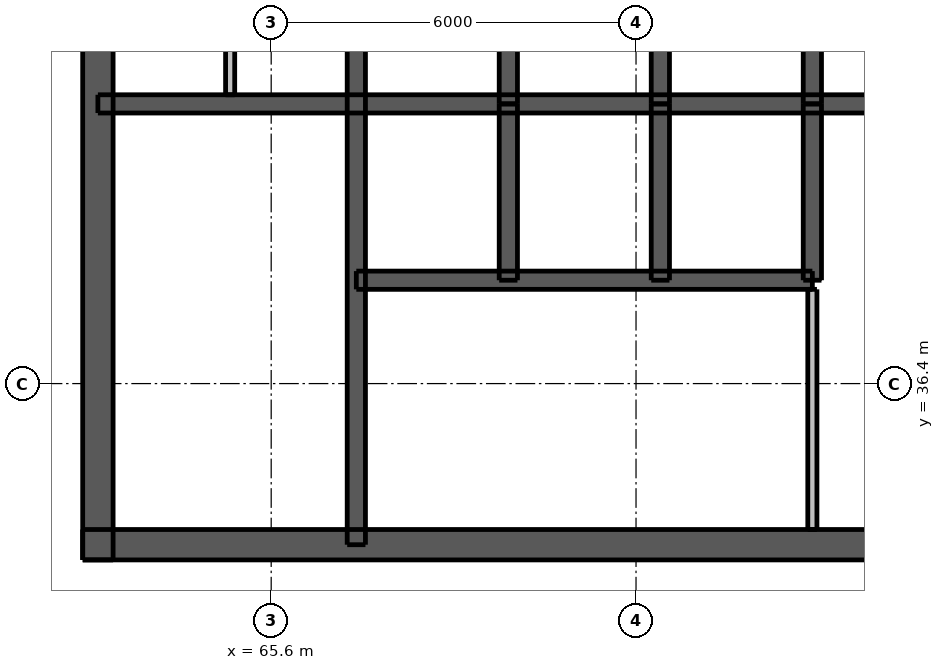
"""IFC4 building model, lengths in metres.
Left out: names, types, materials, properties, quantities, classifications, styles, units other than length and angle.
Written with IfcOpenShell. Run it as: python <this file> out.ifc"""

import sys

from ifc_helpers import new_model, si_unit, direction, frame, frame_2d, origin, place, context, subcontext, project, spatial, rectangle, extrude, element, fill, save


model = new_model("IFC4")
c1 = context("Model", 3, precision=1e-05, world=origin(), true_north=direction((0.0, 1.0)))
c2 = subcontext(c1, "Body", "Model", "MODEL_VIEW")
j1 = project(units=[si_unit("LENGTHUNIT", "METRE"), si_unit("PLANEANGLEUNIT", "RADIAN")], contexts=[c1])
p1 = place(None, origin())
s1 = spatial("IfcSite", under=j1, at=p1, CompositionType="ELEMENT")
p2 = place(p1, origin())
s2 = spatial("IfcBuilding", under=s1, at=p2, CompositionType="ELEMENT")
p3 = place(p2, frame((0.0, 0.0, 281.8)))
s3 = spatial("IfcBuildingStorey", under=s2, at=p3, CompositionType="ELEMENT", Elevation=281.8)
p4 = place(p3, frame((62.5, 33.75, 0.0), z_axis=(0.0, 0.0, 1.0), x_axis=(1.0, 0.0, 0.0)))
e1 = element("IfcWall", 1, at=p4, inside=s3, PredefinedType="SHEAR", context=c2, shape_type="SweptSolid", body=[
    extrude(rectangle(XDim=24.0, YDim=0.5, at=frame_2d((12.0, 0.0))), origin(), (0.0, 0.0, 1.0), 4.2),
])
p5 = place(p4, frame((1.875, 0.0, 0.0)))
e2 = element("IfcOpeningElement", 2, at=p5, cuts=e1, PredefinedType="OPENING", context=c2, shape_type="SweptSolid", body=[
    extrude(rectangle(XDim=1.1, YDim=2.1, at=frame_2d((0.55, 1.05))), frame((0.0, 0.26, 0.0), z_axis=(0.0, -1.0, 0.0), x_axis=(1.0, 0.0, 0.0)), (0.0, 0.0, 1.0), 0.52),
])
p6 = place(p4, frame((21.025, 0.0, 0.0)))
e3 = element("IfcOpeningElement", 3, at=p6, cuts=e1, PredefinedType="OPENING", context=c2, shape_type="SweptSolid", body=[
    extrude(rectangle(XDim=1.1, YDim=2.1, at=frame_2d((0.55, 1.05))), frame((0.0, 0.26, 0.0), z_axis=(0.0, -1.0, 0.0), x_axis=(1.0, 0.0, 0.0)), (0.0, 0.0, 1.0), 0.52),
])
p7 = place(p4, frame((8.0, 0.0, 0.0)))
e4 = element("IfcOpeningElement", 4, at=p7, cuts=e1, PredefinedType="OPENING", context=c2, shape_type="SweptSolid", body=[
    extrude(rectangle(XDim=1.1, YDim=2.1, at=frame_2d((0.55, 1.05))), frame((0.0, 0.26, 0.0), z_axis=(0.0, -1.0, 0.0), x_axis=(1.0, 0.0, 0.0)), (0.0, 0.0, 1.0), 0.52),
])
p8 = place(p4, frame((13.5, 0.0, 0.0)))
e5 = element("IfcOpeningElement", 5, at=p8, cuts=e1, PredefinedType="OPENING", context=c2, shape_type="SweptSolid", body=[
    extrude(rectangle(XDim=0.9, YDim=2.1, at=frame_2d((0.45, 1.05))), frame((0.0, 0.26, 0.0), z_axis=(0.0, -1.0, 0.0), x_axis=(1.0, 0.0, 0.0)), (0.0, 0.0, 1.0), 0.52),
])
p9 = place(p4, frame((17.1, 0.0, 0.0)))
e6 = element("IfcOpeningElement", 6, at=p9, cuts=e1, PredefinedType="OPENING", context=c2, shape_type="SweptSolid", body=[
    extrude(rectangle(XDim=0.9, YDim=2.1, at=frame_2d((0.45, 1.05))), frame((0.0, 0.26, 0.0), z_axis=(0.0, -1.0, 0.0), x_axis=(1.0, 0.0, 0.0)), (0.0, 0.0, 1.0), 0.52),
])
p10 = place(p3, frame((62.75, 33.5, 0.0), z_axis=(0.0, 0.0, 1.0), x_axis=(0.0, 1.0, 0.0)))
e7 = element("IfcWall", 7, at=p10, inside=s3, PredefinedType="SHEAR", context=c2, shape_type="SweptSolid", body=[
    extrude(rectangle(XDim=24.0, YDim=0.5, at=frame_2d((12.0, 0.0))), origin(), (0.0, 0.0, 1.0), 4.2),
])
p11 = place(p10, frame((11.2, 0.0, 0.0)))
e8 = element("IfcOpeningElement", 8, at=p11, cuts=e7, PredefinedType="OPENING", context=c2, shape_type="SweptSolid", body=[
    extrude(rectangle(XDim=1.6, YDim=2.1, at=frame_2d((0.8, 1.05))), frame((0.0, 0.26, 0.0), z_axis=(0.0, -1.0, 0.0), x_axis=(1.0, 0.0, 0.0)), (0.0, 0.0, 1.0), 0.52),
])
p12 = place(p3, frame((62.75, 41.0, 0.0), z_axis=(0.0, 0.0, 1.0), x_axis=(1.0, 0.0, 0.0)))
e9 = element("IfcWall", 9, at=p12, inside=s3, PredefinedType="SHEAR", context=c2, shape_type="SweptSolid", body=[
    extrude(rectangle(XDim=23.5, YDim=0.3, at=frame_2d((11.75, 0.0))), origin(), (0.0, 0.0, 1.0), 4.2),
])
p13 = place(p3, frame((67.0, 33.75, 0.0), z_axis=(0.0, 0.0, 1.0), x_axis=(0.0, 1.0, 0.0)))
e10 = element("IfcWall", 10, at=p13, inside=s3, PredefinedType="SHEAR", context=c2, shape_type="SweptSolid", body=[
    extrude(rectangle(XDim=10.15, YDim=0.3, at=frame_2d((5.075, 0.0))), origin(), (0.0, 0.0, 1.0), 4.2),
])
p14 = place(p13, frame((0.45, 0.0, 0.0)))
e11 = element("IfcOpeningElement", 11, at=p14, cuts=e10, PredefinedType="OPENING", context=c2, shape_type="SweptSolid", body=[
    extrude(rectangle(XDim=1.1, YDim=2.1, at=frame_2d((0.55, 1.05))), frame((0.0, 0.16, 0.0), z_axis=(0.0, -1.0, 0.0), x_axis=(1.0, 0.0, 0.0)), (0.0, 0.0, 1.0), 0.32),
])
for number, where, z_axis, x_axis in (
    (12, (69.5, 41.0, 0.0), (0.0, 0.0, 1.0), (0.0, 1.0, 0.0)),
    (13, (72.0, 41.0, 0.0), (0.0, 0.0, 1.0), (0.0, 1.0, 0.0)),
    (14, (74.5, 41.0, 0.0), (0.0, 0.0, 1.0), (0.0, 1.0, 0.0)),
):
    element("IfcWall", number, at=place(p3, frame(where, z_axis=z_axis, x_axis=x_axis)), inside=s3, PredefinedType="SHEAR", context=c2, shape_type="SweptSolid", body=[
        extrude(rectangle(XDim=2.9, YDim=0.3, at=frame_2d((1.45, 0.0))), origin(), (0.0, 0.0, 1.0), 4.2),
    ])
p15 = place(p3, frame((67.0, 38.1, 0.0), z_axis=(0.0, 0.0, 1.0), x_axis=(1.0, 0.0, 0.0)))
e15 = element("IfcWall", 15, at=p15, inside=s3, PredefinedType="SHEAR", context=c2, shape_type="SweptSolid", body=[
    extrude(rectangle(XDim=7.5, YDim=0.3, at=frame_2d((3.75, 0.0))), origin(), (0.0, 0.0, 1.0), 4.2),
])
p16 = place(p15, frame((0.7, 0.0, 0.0)))
e16 = element("IfcOpeningElement", 16, at=p16, cuts=e15, PredefinedType="OPENING", context=c2, shape_type="SweptSolid", body=[
    extrude(rectangle(XDim=1.1, YDim=2.1, at=frame_2d((0.55, 1.05))), frame((0.0, 0.16, 0.0), z_axis=(0.0, -1.0, 0.0), x_axis=(1.0, 0.0, 0.0)), (0.0, 0.0, 1.0), 0.32),
])
p17 = place(p15, frame((3.2, 0.0, 0.0)))
e17 = element("IfcOpeningElement", 17, at=p17, cuts=e15, PredefinedType="OPENING", context=c2, shape_type="SweptSolid", body=[
    extrude(rectangle(XDim=1.1, YDim=2.1, at=frame_2d((0.55, 1.05))), frame((0.0, 0.16, 0.0), z_axis=(0.0, -1.0, 0.0), x_axis=(1.0, 0.0, 0.0)), (0.0, 0.0, 1.0), 0.32),
])
p18 = place(p15, frame((5.65, 0.0, 0.0)))
e18 = element("IfcOpeningElement", 18, at=p18, cuts=e15, PredefinedType="OPENING", context=c2, shape_type="SweptSolid", body=[
    extrude(rectangle(XDim=1.2, YDim=2.1, at=frame_2d((0.6, 1.05))), frame((0.0, 0.16, 0.0), z_axis=(0.0, -1.0, 0.0), x_axis=(1.0, 0.0, 0.0)), (0.0, 0.0, 1.0), 0.32),
])
for number, where, z_axis, x_axis in (
    (19, (69.5, 38.1, 0.0), (0.0, 0.0, 1.0), (0.0, 1.0, 0.0)),
    (20, (72.0, 38.1, 0.0), (0.0, 0.0, 1.0), (0.0, 1.0, 0.0)),
    (21, (74.5, 38.1, 0.0), (0.0, 0.0, 1.0), (0.0, 1.0, 0.0)),
):
    element("IfcWall", number, at=place(p3, frame(where, z_axis=z_axis, x_axis=x_axis)), inside=s3, PredefinedType="SHEAR", context=c2, shape_type="SweptSolid", body=[
        extrude(rectangle(XDim=2.9, YDim=0.3, at=frame_2d((1.45, 0.0))), origin(), (0.0, 0.0, 1.0), 4.2),
    ])
p19 = place(p3, frame((74.5, 34.0, 0.0), z_axis=(0.0, 0.0, 1.0), x_axis=(0.0, 1.0, 0.0)))
e22 = element("IfcWall", 22, at=p19, inside=s3, PredefinedType="PLUMBINGWALL", context=c2, shape_type="SweptSolid", body=[
    extrude(rectangle(XDim=3.95, YDim=0.15, at=frame_2d((1.975, 0.0))), origin(), (0.0, 0.0, 1.0), 4.2),
])
p20 = place(p3, frame((64.925, 41.15, 0.0), z_axis=(0.0, 0.0, 1.0), x_axis=(0.0, 1.0, 0.0)))
e23 = element("IfcWall", 23, at=p20, inside=s3, PredefinedType="PLUMBINGWALL", context=c2, shape_type="SweptSolid", body=[
    extrude(rectangle(XDim=2.6, YDim=0.15, at=frame_2d((1.3, 0.0))), origin(), (0.0, 0.0, 1.0), 4.2),
])
p21 = place(p5, origin())
e24 = element("IfcDoor", 24, at=p21, inside=s3, OperationType="SINGLE_SWING_LEFT", PredefinedType="DOOR", context=c2, shape_type="SweptSolid", body=[
    extrude(rectangle(XDim=1.1, YDim=2.1, at=frame_2d((0.55, 1.05))), frame((0.0, 0.237, 0.0), z_axis=(0.0, -1.0, 0.0), x_axis=(1.0, 0.0, 0.0)), (0.0, 0.0, 1.0), 0.05),
])
fill(e2, e24)
p22 = place(p7, origin())
e25 = element("IfcDoor", 25, at=p22, inside=s3, OperationType="SINGLE_SWING_LEFT", PredefinedType="DOOR", context=c2, shape_type="SweptSolid", body=[
    extrude(rectangle(XDim=1.1, YDim=2.1, at=frame_2d((0.55, 1.05))), frame((0.0, 0.237, 0.0), z_axis=(0.0, -1.0, 0.0), x_axis=(1.0, 0.0, 0.0)), (0.0, 0.0, 1.0), 0.05),
])
fill(e4, e25)
p23 = place(p14, origin())
e26 = element("IfcDoor", 26, at=p23, inside=s3, OperationType="SINGLE_SWING_RIGHT", PredefinedType="DOOR", context=c2, shape_type="SweptSolid", body=[
    extrude(rectangle(XDim=1.1, YDim=2.1, at=frame_2d((0.55, 1.05))), frame((0.0, -0.087, 0.0), z_axis=(0.0, -1.0, 0.0), x_axis=(1.0, 0.0, 0.0)), (0.0, 0.0, 1.0), 0.05),
])
fill(e11, e26)
p24 = place(p16, origin())
e27 = element("IfcDoor", 27, at=p24, inside=s3, OperationType="DOUBLE_DOOR_SLIDING", PredefinedType="DOOR", context=c2, shape_type="SweptSolid", body=[
    extrude(rectangle(XDim=1.1, YDim=2.1, at=frame_2d((0.55, 1.05))), frame((0.0, 0.025, 0.0), z_axis=(0.0, -1.0, 0.0), x_axis=(1.0, 0.0, 0.0)), (0.0, 0.0, 1.0), 0.05),
])
fill(e16, e27)
p25 = place(p17, origin())
e28 = element("IfcDoor", 28, at=p25, inside=s3, OperationType="DOUBLE_DOOR_SLIDING", PredefinedType="DOOR", context=c2, shape_type="SweptSolid", body=[
    extrude(rectangle(XDim=1.1, YDim=2.1, at=frame_2d((0.55, 1.05))), frame((0.0, 0.025, 0.0), z_axis=(0.0, -1.0, 0.0), x_axis=(1.0, 0.0, 0.0)), (0.0, 0.0, 1.0), 0.05),
])
fill(e17, e28)
p26 = place(p18, origin())
e29 = element("IfcDoor", 29, at=p26, inside=s3, OperationType="DOUBLE_DOOR_SLIDING", PredefinedType="DOOR", context=c2, shape_type="SweptSolid", body=[
    extrude(rectangle(XDim=1.2, YDim=2.1, at=frame_2d((0.6, 1.05))), frame((0.0, 0.025, 0.0), z_axis=(0.0, -1.0, 0.0), x_axis=(1.0, 0.0, 0.0)), (0.0, 0.0, 1.0), 0.05),
])
fill(e18, e29)
save(model, sys.argv[1])
